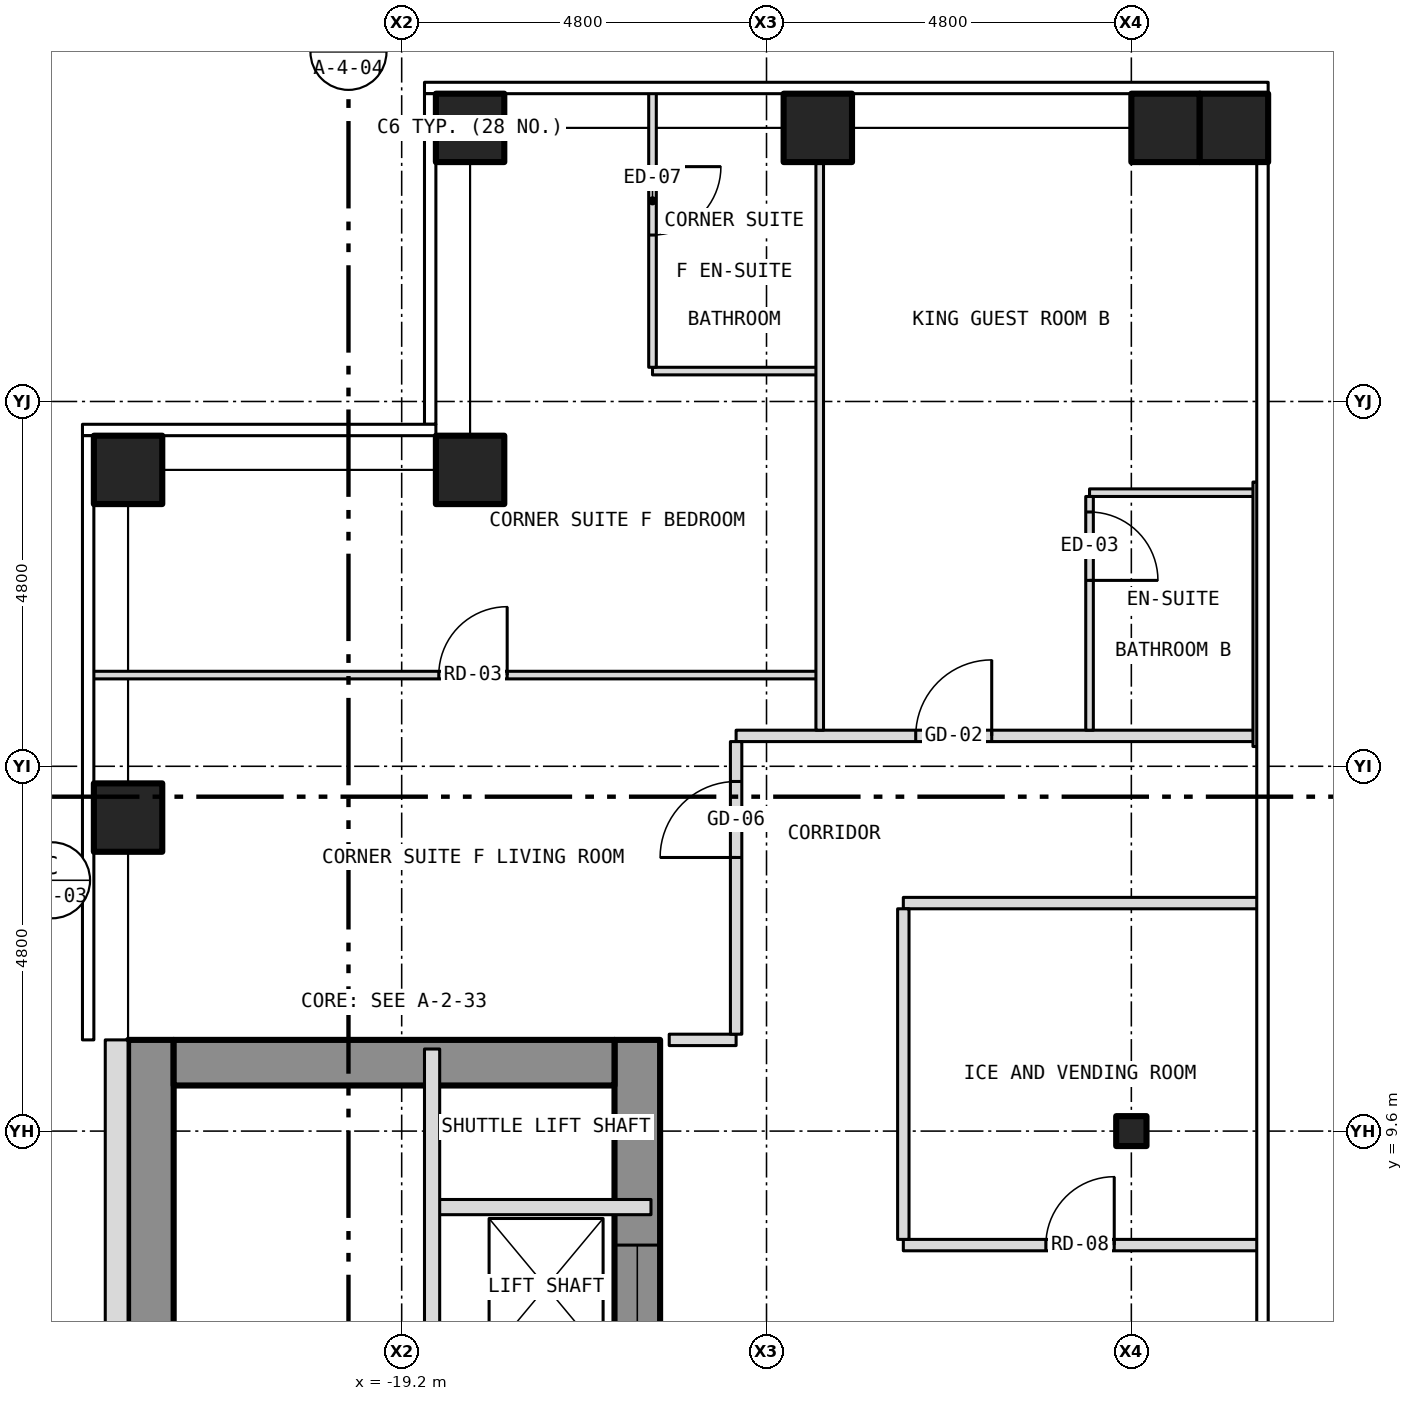
"""IFC4 building model, lengths in metres.
Left out: names, types, materials, properties, quantities, classifications, styles, units other than length and angle.
Written with IfcOpenShell. Run it as: python <this file> out.ifc"""

import sys

from ifc_helpers import new_model, si_unit, direction, frame, frame_2d, origin, origin_2d, place, context, subcontext, project, spatial, rectangle, hollow_rectangle, i_section, extrude, element, fill, save


model = new_model("IFC4")
c1 = context("Model", 3, precision=1e-05, world=origin(), true_north=direction((0.0, 1.0)))
c2 = subcontext(c1, "Body", "Model", "MODEL_VIEW")
j1 = project(units=[si_unit("LENGTHUNIT", "METRE"), si_unit("PLANEANGLEUNIT", "RADIAN")], contexts=[c1])
p1 = place(None, origin())
s1 = spatial("IfcSite", under=j1, at=p1, CompositionType="ELEMENT")
p2 = place(p1, origin())
s2 = spatial("IfcBuilding", under=s1, at=p2, CompositionType="ELEMENT")
p3 = place(p2, frame((0.0, 0.0, 120.5)))
s3 = spatial("IfcBuildingStorey", under=s2, at=p3, CompositionType="ELEMENT", Elevation=120.5)
for number, where, z_axis, x_axis in (
    (1, (-18.3, 22.8, -0.15), (0.0, 0.0, 1.0), (1.0, 0.0, 0.0)),
    (2, (-13.725, 22.8, -0.15), (0.0, 0.0, 1.0), (1.0, 0.0, 0.0)),
    (3, (-9.15, 22.8, -0.15), (0.0, 0.0, 1.0), (1.0, 0.0, 0.0)),
    (4, (-22.8, 13.725, -0.15), (0.0, 0.0, 1.0), (1.0, 0.0, 0.0)),
    (5, (-22.8, 18.3, -0.15), (0.0, 0.0, 1.0), (1.0, 0.0, 0.0)),
    (6, (-18.3, 18.3, -0.15), (0.0, 0.0, 1.0), (1.0, 0.0, 0.0)),
    (7, (-8.25, 22.8, -0.15), (0.0, 0.0, 1.0), (1.0, 0.0, 0.0)),
):
    element("IfcColumn", number, at=place(p3, frame(where, z_axis=z_axis, x_axis=x_axis)), inside=s3, PredefinedType="COLUMN", context=c2, shape_type="SweptSolid", body=[
        extrude(hollow_rectangle(XDim=0.9, YDim=0.9, WallThickness=0.05, at=origin_2d()), origin(), (0.0, 0.0, 1.0), 3.5),
    ])
p4 = place(p3, frame((-9.6, 9.6, -0.15), z_axis=(0.0, 0.0, 1.0), x_axis=(1.0, 0.0, 0.0)))
e8 = element("IfcColumn", 8, at=p4, inside=s3, PredefinedType="COLUMN", context=c2, shape_type="SweptSolid", body=[
    extrude(i_section(OverallWidth=0.399, OverallDepth=0.394, WebThickness=0.023, FlangeThickness=0.037, at=origin_2d()), origin(), (0.0, 0.0, 1.0), 3.5),
])
p5 = place(p3, frame((-16.1, -10.8, 0.0), z_axis=(0.0, 0.0, 1.0), x_axis=(0.0, 1.0, 0.0)))
e9 = element("IfcWall", 9, at=p5, inside=s3, PredefinedType="SHEAR", context=c2, shape_type="SweptSolid", body=[
    extrude(rectangle(XDim=21.6, YDim=0.6, at=frame_2d((10.8, 0.0))), origin(), (0.0, 0.0, 1.0), 3.25),
])
p6 = place(p5, frame((9.4, 0.0, 0.0)))
e10 = element("IfcOpeningElement", 10, at=p6, cuts=e9, PredefinedType="OPENING", context=c2, shape_type="SweptSolid", body=[
    extrude(rectangle(XDim=1.1, YDim=2.1, at=frame_2d((0.55, 1.05))), frame((0.0, 0.312, 0.0), z_axis=(0.0, -1.0, 0.0), x_axis=(1.0, 0.0, 0.0)), (0.0, 0.0, 1.0), 0.624),
])
p7 = place(p5, frame((11.5, 0.0, 0.0)))
e11 = element("IfcOpeningElement", 11, at=p7, cuts=e9, PredefinedType="OPENING", context=c2, shape_type="SweptSolid", body=[
    extrude(rectangle(XDim=1.1, YDim=2.1, at=frame_2d((0.55, 1.05))), frame((0.0, 0.312, 0.0), z_axis=(0.0, -1.0, 0.0), x_axis=(1.0, 0.0, 0.0)), (0.0, 0.0, 1.0), 0.624),
])
p8 = place(p5, frame((13.6, 0.0, 0.0)))
e12 = element("IfcOpeningElement", 12, at=p8, cuts=e9, PredefinedType="OPENING", context=c2, shape_type="SweptSolid", body=[
    extrude(rectangle(XDim=1.1, YDim=2.1, at=frame_2d((0.55, 1.05))), frame((0.0, 0.312, 0.0), z_axis=(0.0, -1.0, 0.0), x_axis=(1.0, 0.0, 0.0)), (0.0, 0.0, 1.0), 0.624),
])
p9 = place(p5, frame((15.7, 0.0, 0.0)))
e13 = element("IfcOpeningElement", 13, at=p9, cuts=e9, PredefinedType="OPENING", context=c2, shape_type="SweptSolid", body=[
    extrude(rectangle(XDim=1.1, YDim=2.1, at=frame_2d((0.55, 1.05))), frame((0.0, 0.312, 0.0), z_axis=(0.0, -1.0, 0.0), x_axis=(1.0, 0.0, 0.0)), (0.0, 0.0, 1.0), 0.624),
])
p10 = place(p5, frame((17.8, 0.0, 0.0)))
e14 = element("IfcOpeningElement", 14, at=p10, cuts=e9, PredefinedType="OPENING", context=c2, shape_type="SweptSolid", body=[
    extrude(rectangle(XDim=1.1, YDim=2.1, at=frame_2d((0.55, 1.05))), frame((0.0, 0.312, 0.0), z_axis=(0.0, -1.0, 0.0), x_axis=(1.0, 0.0, 0.0)), (0.0, 0.0, 1.0), 0.624),
])
p11 = place(p5, frame((0.758, 0.0, 0.0)))
e15 = element("IfcOpeningElement", 15, at=p11, cuts=e9, PredefinedType="OPENING", context=c2, shape_type="SweptSolid", body=[
    extrude(rectangle(XDim=1.1, YDim=2.1, at=frame_2d((0.55, 1.05))), frame((0.0, 0.312, 0.0), z_axis=(0.0, -1.0, 0.0), x_axis=(1.0, 0.0, 0.0)), (0.0, 0.0, 1.0), 0.624),
])
p12 = place(p5, frame((7.5, 0.0, 0.0)))
e16 = element("IfcOpeningElement", 16, at=p12, cuts=e9, PredefinedType="OPENING", context=c2, shape_type="SweptSolid", body=[
    extrude(rectangle(XDim=1.1, YDim=2.1, at=frame_2d((0.55, 1.05))), frame((0.0, 0.312, 0.0), z_axis=(0.0, -1.0, 0.0), x_axis=(1.0, 0.0, 0.0)), (0.0, 0.0, 1.0), 0.624),
])
p13 = place(p3, frame((-22.5, -10.8, 0.0), z_axis=(0.0, 0.0, 1.0), x_axis=(0.0, 1.0, 0.0)))
e17 = element("IfcWall", 17, at=p13, inside=s3, PredefinedType="SHEAR", context=c2, shape_type="SweptSolid", body=[
    extrude(rectangle(XDim=21.6, YDim=0.6, at=frame_2d((10.8, 0.0))), origin(), (0.0, 0.0, 1.0), 3.25),
])
p14 = place(p3, frame((-22.2, 10.5, 0.0), z_axis=(0.0, 0.0, 1.0), x_axis=(1.0, 0.0, 0.0)))
e18 = element("IfcWall", 18, at=p14, inside=s3, PredefinedType="SHEAR", context=c2, shape_type="SweptSolid", body=[
    extrude(rectangle(XDim=5.8, YDim=0.6, at=frame_2d((2.9, 0.0))), origin(), (0.0, 0.0, 1.0), 3.25),
])
p15 = place(p3, frame((-22.95, 10.8, 0.0), z_axis=(0.0, 0.0, 1.0), x_axis=(0.0, -1.0, 0.0)))
e19 = element("IfcWall", 19, at=p15, inside=s3, PredefinedType="SOLIDWALL", context=c2, shape_type="SweptSolid", body=[
    extrude(rectangle(XDim=21.6, YDim=0.3, at=frame_2d((10.8, 0.0))), origin(), (0.0, 0.0, 1.0), 3.5),
])
p16 = place(p15, frame((18.05, 0.0, 1.0)))
e20 = element("IfcOpeningElement", 20, at=p16, cuts=e19, PredefinedType="OPENING", context=c2, shape_type="SweptSolid", body=[
    extrude(rectangle(XDim=0.6, YDim=1.5, at=frame_2d((0.3, 0.75))), frame((0.0, 0.162, 0.0), z_axis=(0.0, -1.0, 0.0), x_axis=(1.0, 0.0, 0.0)), (0.0, 0.0, 1.0), 0.324),
])
p17 = place(p3, frame((-12.6, 8.1, 0.0), z_axis=(0.0, 0.0, 1.0), x_axis=(1.0, 0.0, 0.0)))
e21 = element("IfcWall", 21, at=p17, inside=s3, PredefinedType="PARTITIONING", context=c2, shape_type="SweptSolid", body=[
    extrude(rectangle(XDim=4.68, YDim=0.15, at=frame_2d((2.34, 0.0))), origin(), (0.0, 0.0, 1.0), 3.35),
])
p18 = place(p17, frame((1.875, 0.0, 0.0)))
e22 = element("IfcOpeningElement", 22, at=p18, cuts=e21, PredefinedType="OPENING", context=c2, shape_type="SweptSolid", body=[
    extrude(rectangle(XDim=0.9, YDim=2.1, at=frame_2d((0.45, 1.05))), frame((0.0, 0.087, 0.0), z_axis=(0.0, -1.0, 0.0), x_axis=(1.0, 0.0, 0.0)), (0.0, 0.0, 1.0), 0.174),
])
p19 = place(p3, frame((-18.8, 8.6, 0.0), z_axis=(0.0, 0.0, 1.0), x_axis=(1.0, 0.0, 0.0)))
e23 = element("IfcWall", 23, at=p19, inside=s3, PredefinedType="PARTITIONING", context=c2, shape_type="SweptSolid", body=[
    extrude(rectangle(XDim=2.88, YDim=0.2, at=frame_2d((1.44, 0.0))), origin(), (0.0, 0.0, 1.0), 3.25),
])
p20 = place(p3, frame((-15.68, 10.8, 0.0), z_axis=(0.0, 0.0, 1.0), x_axis=(1.0, 0.0, 0.0)))
e24 = element("IfcWall", 24, at=p20, inside=s3, PredefinedType="PARTITIONING", context=c2, shape_type="SweptSolid", body=[
    extrude(rectangle(XDim=0.88, YDim=0.15, at=frame_2d((0.44, 0.0))), origin(), (0.0, 0.0, 1.0), 3.35),
])
p21 = place(p3, frame((-12.6, 12.6, 0.0), z_axis=(0.0, 0.0, 1.0), x_axis=(1.0, 0.0, 0.0)))
e25 = element("IfcWall", 25, at=p21, inside=s3, PredefinedType="PARTITIONING", context=c2, shape_type="SweptSolid", body=[
    extrude(rectangle(XDim=4.68, YDim=0.15, at=frame_2d((2.34, 0.0))), origin(), (0.0, 0.0, 1.0), 3.35),
])
p22 = place(p3, frame((-14.8, 14.8, 0.0), z_axis=(0.0, 0.0, 1.0), x_axis=(1.0, 0.0, 0.0)))
e26 = element("IfcWall", 26, at=p22, inside=s3, PredefinedType="PARTITIONING", context=c2, shape_type="SweptSolid", body=[
    extrude(rectangle(XDim=6.85, YDim=0.15, at=frame_2d((3.425, 0.0))), origin(), (0.0, 0.0, 1.0), 3.35),
])
p23 = place(p22, frame((2.363, 0.0, 0.0)))
e27 = element("IfcOpeningElement", 27, at=p23, cuts=e26, PredefinedType="OPENING", context=c2, shape_type="SweptSolid", body=[
    extrude(rectangle(XDim=1.0, YDim=2.1, at=frame_2d((0.5, 1.05))), frame((0.0, 0.087, 0.0), z_axis=(0.0, -1.0, 0.0), x_axis=(1.0, 0.0, 0.0)), (0.0, 0.0, 1.0), 0.174),
])
p24 = place(p3, frame((-23.28, 15.6, 0.0), z_axis=(0.0, 0.0, 1.0), x_axis=(1.0, 0.0, 0.0)))
e28 = element("IfcWall", 28, at=p24, inside=s3, PredefinedType="PARTITIONING", context=c2, shape_type="SweptSolid", body=[
    extrude(rectangle(XDim=9.58, YDim=0.1, at=frame_2d((4.79, 0.0))), origin(), (0.0, 0.0, 1.0), 3.35),
])
p25 = place(p24, frame((4.568, 0.0, 0.0)))
e29 = element("IfcOpeningElement", 29, at=p25, cuts=e28, PredefinedType="OPENING", context=c2, shape_type="SweptSolid", body=[
    extrude(rectangle(XDim=0.9, YDim=2.1, at=frame_2d((0.45, 1.05))), frame((0.0, 0.062, 0.0), z_axis=(0.0, -1.0, 0.0), x_axis=(1.0, 0.0, 0.0)), (0.0, 0.0, 1.0), 0.124),
])
for number, where, z_axis, x_axis in (
    (30, (-10.15, 18.0, 0.0), (0.0, 0.0, 1.0), (1.0, 0.0, 0.0)),
    (31, (-15.9, 19.6, 0.0), (0.0, 0.0, 1.0), (1.0, 0.0, 0.0)),
):
    element("IfcWall", number, at=place(p3, frame(where, z_axis=z_axis, x_axis=x_axis)), inside=s3, PredefinedType="PARTITIONING", context=c2, shape_type="SweptSolid", body=[
        extrude(rectangle(XDim=2.2, YDim=0.1, at=frame_2d((1.1, 0.0))), origin(), (0.0, 0.0, 1.0), 3.35),
    ])
p26 = place(p3, frame((-18.8, -1.8, 0.0), z_axis=(0.0, 0.0, 1.0), x_axis=(0.0, 1.0, 0.0)))
e32 = element("IfcWall", 32, at=p26, inside=s3, PredefinedType="PARTITIONING", context=c2, shape_type="SweptSolid", body=[
    extrude(rectangle(XDim=12.48, YDim=0.2, at=frame_2d((6.24, 0.0))), origin(), (0.0, 0.0, 1.0), 3.25),
])
p27 = place(p3, frame((-15.9, 19.65, 0.0), z_axis=(0.0, 0.0, 1.0), x_axis=(0.0, 1.0, 0.0)))
e33 = element("IfcWall", 33, at=p27, inside=s3, PredefinedType="PARTITIONING", context=c2, shape_type="SweptSolid", body=[
    extrude(rectangle(XDim=3.63, YDim=0.1, at=frame_2d((1.815, 0.0))), origin(), (0.0, 0.0, 1.0), 3.35),
])
p28 = place(p27, frame((1.74, 0.0, 0.0)))
e34 = element("IfcOpeningElement", 34, at=p28, cuts=e33, PredefinedType="OPENING", context=c2, shape_type="SweptSolid", body=[
    extrude(rectangle(XDim=0.9, YDim=2.1, at=frame_2d((0.45, 1.05))), frame((0.0, 0.062, 0.0), z_axis=(0.0, -1.0, 0.0), x_axis=(1.0, 0.0, 0.0)), (0.0, 0.0, 1.0), 0.124),
])
p29 = place(p3, frame((-14.8, 10.875, 0.0), z_axis=(0.0, 0.0, 1.0), x_axis=(0.0, 1.0, 0.0)))
e35 = element("IfcWall", 35, at=p29, inside=s3, PredefinedType="PARTITIONING", context=c2, shape_type="SweptSolid", body=[
    extrude(rectangle(XDim=3.85, YDim=0.15, at=frame_2d((1.925, 0.0))), origin(), (0.0, 0.0, 1.0), 3.35),
])
p30 = place(p29, frame((2.325, 0.0, 0.0)))
e36 = element("IfcOpeningElement", 36, at=p30, cuts=e35, PredefinedType="OPENING", context=c2, shape_type="SweptSolid", body=[
    extrude(rectangle(XDim=1.0, YDim=2.1, at=frame_2d((0.5, 1.05))), frame((0.0, 0.087, 0.0), z_axis=(0.0, -1.0, 0.0), x_axis=(1.0, 0.0, 0.0)), (0.0, 0.0, 1.0), 0.174),
])
p31 = place(p3, frame((-13.7, 14.875, 0.0), z_axis=(0.0, 0.0, 1.0), x_axis=(0.0, 1.0, 0.0)))
e37 = element("IfcWall", 37, at=p31, inside=s3, PredefinedType="PARTITIONING", context=c2, shape_type="SweptSolid", body=[
    extrude(rectangle(XDim=7.805, YDim=0.1, at=frame_2d((3.902, 0.0))), origin(), (0.0, 0.0, 1.0), 3.35),
])
p32 = place(p3, frame((-12.6, 8.175, 0.0), z_axis=(0.0, 0.0, 1.0), x_axis=(0.0, 1.0, 0.0)))
e38 = element("IfcWall", 38, at=p32, inside=s3, PredefinedType="PARTITIONING", context=c2, shape_type="SweptSolid", body=[
    extrude(rectangle(XDim=4.35, YDim=0.15, at=frame_2d((2.175, 0.0))), origin(), (0.0, 0.0, 1.0), 3.35),
])
p33 = place(p3, frame((-10.15, 14.875, 0.0), z_axis=(0.0, 0.0, 1.0), x_axis=(0.0, 1.0, 0.0)))
e39 = element("IfcWall", 39, at=p33, inside=s3, PredefinedType="PARTITIONING", context=c2, shape_type="SweptSolid", body=[
    extrude(rectangle(XDim=3.075, YDim=0.1, at=frame_2d((1.538, 0.0))), origin(), (0.0, 0.0, 1.0), 3.35),
])
p34 = place(p33, frame((1.971, 0.0, 0.0)))
e40 = element("IfcOpeningElement", 40, at=p34, cuts=e39, PredefinedType="OPENING", context=c2, shape_type="SweptSolid", body=[
    extrude(rectangle(XDim=0.9, YDim=2.1, at=frame_2d((0.45, 1.05))), frame((0.0, 0.062, 0.0), z_axis=(0.0, -1.0, 0.0), x_axis=(1.0, 0.0, 0.0)), (0.0, 0.0, 1.0), 0.124),
])
p35 = place(p3, frame((-7.95, 14.66, 0.0), z_axis=(0.0, 0.0, 1.0), x_axis=(0.0, 1.0, 0.0)))
e41 = element("IfcWall", 41, at=p35, inside=s3, PredefinedType="PARTITIONING", context=c2, shape_type="SweptSolid", body=[
    extrude(rectangle(XDim=3.48, YDim=0.1, at=frame_2d((1.74, 0.0))), origin(), (0.0, 0.0, 1.0), 2.733),
])
p36 = place(p10, origin())
e42 = element("IfcDoor", 42, at=p36, inside=s3, OperationType="SLIDING_TO_LEFT", PredefinedType="DOOR", context=c2, shape_type="SweptSolid", body=[
    extrude(rectangle(XDim=1.1, YDim=2.1, at=frame_2d((0.55, 1.05))), frame((0.0, 0.025, 0.0), z_axis=(0.0, -1.0, 0.0), x_axis=(1.0, 0.0, 0.0)), (0.0, 0.0, 1.0), 0.05),
])
fill(e14, e42)
p37 = place(p23, origin())
e43 = element("IfcDoor", 43, at=p37, inside=s3, OperationType="SINGLE_SWING_RIGHT", PredefinedType="DOOR", context=c2, shape_type="SweptSolid", body=[
    extrude(rectangle(XDim=1.0, YDim=2.1, at=frame_2d((0.5, 1.05))), frame((0.0, 0.025, 0.0), z_axis=(0.0, -1.0, 0.0), x_axis=(1.0, 0.0, 0.0)), (0.0, 0.0, 1.0), 0.05),
])
fill(e27, e43)
p38 = place(p34, origin())
e44 = element("IfcDoor", 44, at=p38, inside=s3, OperationType="SINGLE_SWING_LEFT", PredefinedType="DOOR", context=c2, shape_type="SweptSolid", body=[
    extrude(rectangle(XDim=0.9, YDim=2.1, at=frame_2d((0.45, 1.05))), frame((0.0, 0.025, 0.0), z_axis=(0.0, -1.0, 0.0), x_axis=(1.0, 0.0, 0.0)), (0.0, 0.0, 1.0), 0.05),
])
fill(e40, e44)
p39 = place(p30, origin())
e45 = element("IfcDoor", 45, at=p39, inside=s3, OperationType="SINGLE_SWING_LEFT", PredefinedType="DOOR", context=c2, shape_type="SweptSolid", body=[
    extrude(rectangle(XDim=1.0, YDim=2.1, at=frame_2d((0.5, 1.05))), frame((0.0, 0.025, 0.0), z_axis=(0.0, -1.0, 0.0), x_axis=(1.0, 0.0, 0.0)), (0.0, 0.0, 1.0), 0.05),
])
fill(e36, e45)
p40 = place(p25, origin())
e46 = element("IfcDoor", 46, at=p40, inside=s3, OperationType="SINGLE_SWING_RIGHT", PredefinedType="DOOR", context=c2, shape_type="SweptSolid", body=[
    extrude(rectangle(XDim=0.9, YDim=2.1, at=frame_2d((0.45, 1.05))), frame((0.0, 0.025, 0.0), z_axis=(0.0, -1.0, 0.0), x_axis=(1.0, 0.0, 0.0)), (0.0, 0.0, 1.0), 0.05),
])
fill(e29, e46)
p41 = place(p28, origin())
e47 = element("IfcDoor", 47, at=p41, inside=s3, OperationType="SINGLE_SWING_RIGHT", PredefinedType="DOOR", context=c2, shape_type="SweptSolid", body=[
    extrude(rectangle(XDim=0.9, YDim=2.1, at=frame_2d((0.45, 1.05))), frame((0.0, 0.025, 0.0), z_axis=(0.0, -1.0, 0.0), x_axis=(1.0, 0.0, 0.0)), (0.0, 0.0, 1.0), 0.05),
])
fill(e34, e47)
p42 = place(p18, origin())
e48 = element("IfcDoor", 48, at=p42, inside=s3, OperationType="SINGLE_SWING_RIGHT", PredefinedType="DOOR", context=c2, shape_type="SweptSolid", body=[
    extrude(rectangle(XDim=0.9, YDim=2.1, at=frame_2d((0.45, 1.05))), frame((0.0, 0.025, 0.0), z_axis=(0.0, -1.0, 0.0), x_axis=(1.0, 0.0, 0.0)), (0.0, 0.0, 1.0), 0.05),
])
fill(e22, e48)
save(model, sys.argv[1])
